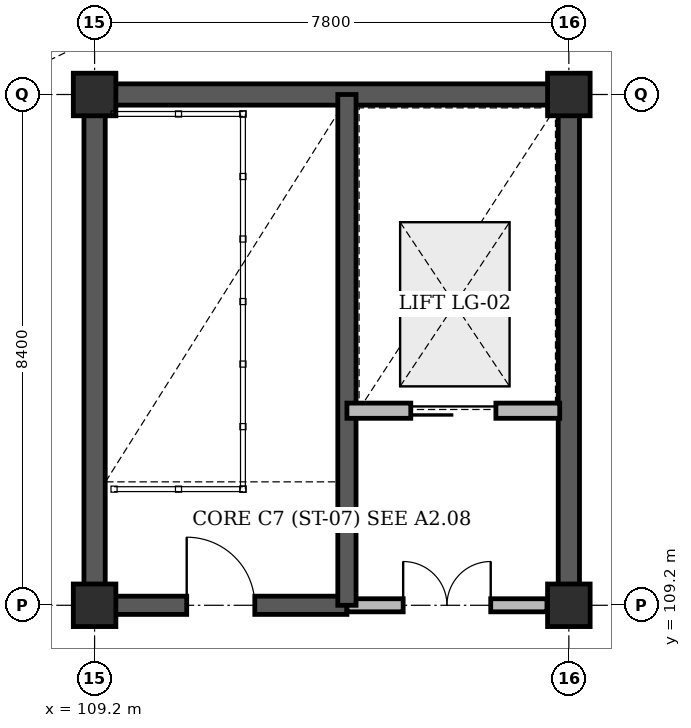
"""IFC4 building model, lengths in metres.
Left out: names, types, materials, properties, quantities, classifications, styles, units other than length and angle.
Written with IfcOpenShell. Run it as: python <this file> out.ifc"""

import sys

from ifc_helpers import new_model, si_unit, direction, frame, frame_2d, origin, origin_2d, place, context, subcontext, project, spatial, rectangle, extrude, element, fill, save


model = new_model("IFC4")
c1 = context("Model", 3, precision=1e-05, world=origin(), true_north=direction((0.0, 1.0)))
c2 = subcontext(c1, "Body", "Model", "MODEL_VIEW")
j1 = project(units=[si_unit("LENGTHUNIT", "METRE"), si_unit("PLANEANGLEUNIT", "RADIAN")], contexts=[c1])
p1 = place(None, origin())
s1 = spatial("IfcSite", under=j1, at=p1, CompositionType="ELEMENT")
p2 = place(p1, origin())
s2 = spatial("IfcBuilding", under=s1, at=p2, CompositionType="ELEMENT")
p3 = place(p2, frame((0.0, 0.0, 14.4)))
s3 = spatial("IfcBuildingStorey", under=s2, at=p3, CompositionType="ELEMENT", Elevation=14.4)
p4 = place(p3, frame((109.025, 117.6, 0.0), z_axis=(0.0, 0.0, 1.0), x_axis=(1.0, 0.0, 0.0)))
e1 = element("IfcWall", 1, at=p4, inside=s3, PredefinedType="SHEAR", context=c2, shape_type="SweptSolid", body=[
    extrude(rectangle(XDim=8.15, YDim=0.35, at=frame_2d((4.075, 0.0))), origin(), (0.0, 0.0, 1.0), 3.6),
])
for number, where, z_axis, x_axis in (
    (2, (109.2, 109.2, 0.0), (0.0, 0.0, 1.0), (0.0, 1.0, 0.0)),
    (3, (117.0, 109.2, 0.0), (0.0, 0.0, 1.0), (0.0, 1.0, 0.0)),
):
    element("IfcWall", number, at=place(p3, frame(where, z_axis=z_axis, x_axis=x_axis)), inside=s3, PredefinedType="SHEAR", context=c2, shape_type="SweptSolid", body=[
        extrude(rectangle(XDim=8.4, YDim=0.35, at=frame_2d((4.2, 0.0))), origin(), (0.0, 0.0, 1.0), 3.6),
    ])
for number, where, z_axis, x_axis in (
    (4, (109.2, 109.2, 0.0), (0.0, 0.0, 1.0), (1.0, 0.0, 0.0)),
    (5, (109.2, 117.6, 0.0), (0.0, 0.0, 1.0), (1.0, 0.0, 0.0)),
    (6, (117.0, 109.2, 0.0), (0.0, 0.0, 1.0), (1.0, 0.0, 0.0)),
    (7, (117.0, 117.6, 0.0), (0.0, 0.0, 1.0), (1.0, 0.0, 0.0)),
):
    element("IfcColumn", number, at=place(p3, frame(where, z_axis=z_axis, x_axis=x_axis)), inside=s3, PredefinedType="COLUMN", context=c2, shape_type="SweptSolid", body=[
        extrude(rectangle(XDim=0.7, YDim=0.7, at=origin_2d()), origin(), (0.0, 0.0, 1.0), 3.6),
    ])
p5 = place(p3, frame((109.2, 109.2, 0.0), z_axis=(0.0, 0.0, 1.0), x_axis=(1.0, 0.0, 0.0)))
e8 = element("IfcWall", 8, at=p5, inside=s3, PredefinedType="SHEAR", context=c2, shape_type="SweptSolid", body=[
    extrude(rectangle(XDim=4.15, YDim=0.3, at=frame_2d((2.075, 0.0))), origin(), (0.0, 0.0, 1.0), 3.6),
])
p6 = place(p5, frame((1.515, 0.0, 0.0)))
e9 = element("IfcOpeningElement", 9, at=p6, cuts=e8, PredefinedType="OPENING", context=c2, shape_type="SweptSolid", body=[
    extrude(rectangle(XDim=1.12, YDim=2.15, at=frame_2d((0.56, 1.075))), frame((0.0, 0.16, 0.0), z_axis=(0.0, -1.0, 0.0), x_axis=(1.0, 0.0, 0.0)), (0.0, 0.0, 1.0), 0.32),
])
p7 = place(p3, frame((113.35, 109.2, 0.0), z_axis=(0.0, 0.0, 1.0), x_axis=(1.0, 0.0, 0.0)))
e10 = element("IfcWall", 10, at=p7, inside=s3, PredefinedType="STANDARD", context=c2, shape_type="SweptSolid", body=[
    extrude(rectangle(XDim=3.29, YDim=0.215, at=frame_2d((1.645, 0.0))), origin(), (0.0, 0.0, 1.0), 2.62),
])
p8 = place(p7, frame((0.925, 0.0, 0.0)))
e11 = element("IfcOpeningElement", 11, at=p8, cuts=e10, PredefinedType="OPENING", context=c2, shape_type="SweptSolid", body=[
    extrude(rectangle(XDim=1.44, YDim=2.2, at=frame_2d((0.72, 1.1))), frame((0.0, 0.118, 0.0), z_axis=(0.0, -1.0, 0.0), x_axis=(1.0, 0.0, 0.0)), (0.0, 0.0, 1.0), 0.235),
])
p9 = place(p3, frame((113.35, 109.2, 0.0), z_axis=(0.0, 0.0, 1.0), x_axis=(0.0, 1.0, 0.0)))
e12 = element("IfcWall", 12, at=p9, inside=s3, PredefinedType="SHEAR", context=c2, shape_type="SweptSolid", body=[
    extrude(rectangle(XDim=8.4, YDim=0.3, at=frame_2d((4.2, 0.0))), origin(), (0.0, 0.0, 1.0), 3.6),
])
p10 = place(p3, frame((113.35, 112.4, 0.0), z_axis=(0.0, 0.0, 1.0), x_axis=(1.0, 0.0, 0.0)))
e13 = element("IfcWall", 13, at=p10, inside=s3, PredefinedType="STANDARD", context=c2, shape_type="SweptSolid", body=[
    extrude(rectangle(XDim=3.5, YDim=0.25, at=frame_2d((1.75, 0.0))), origin(), (0.0, 0.0, 1.0), 3.3),
])
p11 = place(p10, frame((1.05, 0.0, 0.0)))
e14 = element("IfcOpeningElement", 14, at=p11, cuts=e13, PredefinedType="OPENING", context=c2, shape_type="SweptSolid", body=[
    extrude(rectangle(XDim=1.4, YDim=2.2, at=frame_2d((0.7, 1.1))), frame((0.0, 0.135, 0.0), z_axis=(0.0, -1.0, 0.0), x_axis=(1.0, 0.0, 0.0)), (0.0, 0.0, 1.0), 0.27),
])
p12 = place(p6, origin())
e15 = element("IfcDoor", 15, at=p12, inside=s3, OperationType="SINGLE_SWING_LEFT", PredefinedType="DOOR", context=c2, shape_type="SweptSolid", body=[
    extrude(rectangle(XDim=1.12, YDim=2.15, at=frame_2d((0.56, 1.075))), frame((0.0, 0.025, 0.0), z_axis=(0.0, -1.0, 0.0), x_axis=(1.0, 0.0, 0.0)), (0.0, 0.0, 1.0), 0.05),
])
fill(e9, e15)
p13 = place(p8, origin())
e16 = element("IfcDoor", 16, at=p13, inside=s3, OperationType="DOUBLE_DOOR_SINGLE_SWING", PredefinedType="DOOR", context=c2, shape_type="SweptSolid", body=[
    extrude(rectangle(XDim=1.44, YDim=2.2, at=frame_2d((0.72, 1.1))), frame((0.0, 0.025, 0.0), z_axis=(0.0, -1.0, 0.0), x_axis=(1.0, 0.0, 0.0)), (0.0, 0.0, 1.0), 0.05),
])
fill(e11, e16)
p14 = place(p11, origin())
e17 = element("IfcDoor", 17, at=p14, inside=s3, OperationType="SLIDING_TO_LEFT", PredefinedType="DOOR", context=c2, shape_type="SweptSolid", body=[
    extrude(rectangle(XDim=1.4, YDim=2.2, at=frame_2d((0.7, 1.1))), frame((0.0, 0.025, 0.0), z_axis=(0.0, -1.0, 0.0), x_axis=(1.0, 0.0, 0.0)), (0.0, 0.0, 1.0), 0.05),
])
fill(e14, e17)
save(model, sys.argv[1])
